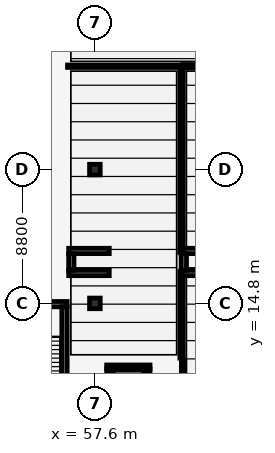
"""IFC4 building model, lengths in metres.
Left out: names, types, materials, properties, quantities, classifications, styles, units other than length and angle.
Written with IfcOpenShell. Run it as: python <this file> out.ifc"""

import sys

from ifc_helpers import new_model, si_unit, direction, frame, frame_2d, origin, origin_2d, place, context, subcontext, project, spatial, rectangle, extrude, element, fill, save


model = new_model("IFC4")
c1 = context("Model", 3, precision=1e-05, world=origin(), true_north=direction((0.0, 1.0)))
c2 = subcontext(c1, "Body", "Model", "MODEL_VIEW")
j1 = project(units=[si_unit("LENGTHUNIT", "METRE"), si_unit("PLANEANGLEUNIT", "RADIAN")], contexts=[c1])
p1 = place(None, origin())
s1 = spatial("IfcSite", under=j1, at=p1, CompositionType="ELEMENT")
p2 = place(p1, origin())
s2 = spatial("IfcBuilding", under=s1, at=p2, CompositionType="ELEMENT")
p3 = place(p2, frame((0.0, 0.0, -4.2)))
s3 = spatial("IfcBuildingStorey", under=s2, at=p3, CompositionType="ELEMENT", Elevation=-4.2)
for number, where, z_axis, x_axis in (
    (1, (57.6, 14.8, 0.0), (0.0, 0.0, 1.0), (1.0, 0.0, 0.0)),
    (2, (57.6, 23.6, 0.0), (0.0, 0.0, 1.0), (1.0, 0.0, 0.0)),
):
    element("IfcColumn", number, at=place(p3, frame(where, z_axis=z_axis, x_axis=x_axis)), inside=s3, PredefinedType="COLUMN", context=c2, shape_type="SweptSolid", body=[
        extrude(rectangle(XDim=0.7, YDim=0.7, at=origin_2d()), origin(), (0.0, 0.0, 1.0), 4.2),
    ])
p4 = place(p3, frame((50.125, 14.75, 0.0), z_axis=(0.0, 0.0, 1.0), x_axis=(1.0, 0.0, 0.0)))
e3 = element("IfcWall", 3, at=p4, inside=s3, PredefinedType="SHEAR", context=c2, shape_type="SweptSolid", body=[
    extrude(rectangle(XDim=5.65, YDim=0.35, at=frame_2d((2.825, 0.0))), origin(), (0.0, 0.0, 1.0), 3.95),
])
p5 = place(p3, frame((55.6, 14.575, 0.0), z_axis=(0.0, 0.0, 1.0), x_axis=(0.0, -1.0, 0.0)))
e4 = element("IfcWall", 4, at=p5, inside=s3, PredefinedType="SHEAR", context=c2, shape_type="SweptSolid", body=[
    extrude(rectangle(XDim=7.95, YDim=0.35, at=frame_2d((3.975, 0.0))), origin(), (0.0, 0.0, 1.0), 3.95),
])
p6 = place(p5, frame((5.68, 0.0, 0.0)))
e5 = element("IfcOpeningElement", 5, at=p6, cuts=e4, PredefinedType="OPENING", context=c2, shape_type="SweptSolid", body=[
    extrude(rectangle(XDim=2.05, YDim=2.15, at=frame_2d((1.025, 1.075))), frame((0.0, 0.185, 0.0), z_axis=(0.0, -1.0, 0.0), x_axis=(1.0, 0.0, 0.0)), (0.0, 0.0, 1.0), 0.37),
])
for number, where, z_axis, x_axis in (
    (6, (55.875, 16.8, 0.0), (0.0, 0.0, 1.0), (1.0, 0.0, 0.0)),
    (7, (55.875, 18.25, 0.0), (0.0, 0.0, 1.0), (1.0, 0.0, 0.0)),
):
    element("IfcWall", number, at=place(p3, frame(where, z_axis=z_axis, x_axis=x_axis)), inside=s3, PredefinedType="SHEAR", context=c2, shape_type="SweptSolid", body=[
        extrude(rectangle(XDim=2.67, YDim=0.35, at=frame_2d((1.335, 0.0))), origin(), (0.0, 0.0, 1.0), 3.92),
    ])
p7 = place(p3, frame((56.05, 16.975, 0.0), z_axis=(0.0, 0.0, 1.0), x_axis=(0.0, 1.0, 0.0)))
e8 = element("IfcWall", 8, at=p7, inside=s3, PredefinedType="SHEAR", context=c2, shape_type="SweptSolid", body=[
    extrude(rectangle(XDim=1.1, YDim=0.35, at=frame_2d((0.55, 0.0))), origin(), (0.0, 0.0, 1.0), 3.92),
])
for number, where, z_axis, x_axis in (
    (9, (63.275, 16.8, 0.0), (0.0, 0.0, 1.0), (1.0, 0.0, 0.0)),
    (10, (63.275, 18.25, 0.0), (0.0, 0.0, 1.0), (1.0, 0.0, 0.0)),
):
    element("IfcWall", number, at=place(p3, frame(where, z_axis=z_axis, x_axis=x_axis)), inside=s3, PredefinedType="SHEAR", context=c2, shape_type="SweptSolid", body=[
        extrude(rectangle(XDim=2.67, YDim=0.35, at=frame_2d((1.335, 0.0))), origin(), (0.0, 0.0, 1.0), 3.92),
    ])
p8 = place(p3, frame((63.45, 16.975, 0.0), z_axis=(0.0, 0.0, 1.0), x_axis=(0.0, 1.0, 0.0)))
e11 = element("IfcWall", 11, at=p8, inside=s3, PredefinedType="SHEAR", context=c2, shape_type="SweptSolid", body=[
    extrude(rectangle(XDim=1.1, YDim=0.35, at=frame_2d((0.55, 0.0))), origin(), (0.0, 0.0, 1.0), 3.92),
])
p9 = place(p3, frame((58.375, 10.625, -1.5), z_axis=(0.0, 0.0, 1.0), x_axis=(1.0, 0.0, 0.0)))
e12 = element("IfcWall", 12, at=p9, inside=s3, PredefinedType="SOLIDWALL", context=c2, shape_type="SweptSolid", body=[
    extrude(rectangle(XDim=2.85, YDim=0.25, at=frame_2d((1.425, 0.0))), origin(), (0.0, 0.0, 1.0), 5.45),
])
p10 = place(p9, frame((0.875, 0.0, 1.5)))
e13 = element("IfcOpeningElement", 13, at=p10, cuts=e12, PredefinedType="OPENING", context=c2, shape_type="SweptSolid", body=[
    extrude(rectangle(XDim=1.1, YDim=2.15, at=frame_2d((0.55, 1.075))), frame((0.0, 0.135, 0.0), z_axis=(0.0, -1.0, 0.0), x_axis=(1.0, 0.0, 0.0)), (0.0, 0.0, 1.0), 0.27),
])
for number, where, z_axis, x_axis in (
    (14, (58.5, 8.7, -1.5), (0.0, 0.0, 1.0), (0.0, 1.0, 0.0)),
    (15, (61.1, 10.5, -1.5), (0.0, 0.0, 1.0), (0.0, -1.0, 0.0)),
):
    element("IfcWall", number, at=place(p3, frame(where, z_axis=z_axis, x_axis=x_axis)), inside=s3, PredefinedType="SOLIDWALL", context=c2, shape_type="SweptSolid", body=[
        extrude(rectangle(XDim=1.8, YDim=0.25, at=frame_2d((0.9, 0.0))), origin(), (0.0, 0.0, 1.0), 5.45),
    ])
p11 = place(p3, frame((63.3, 11.2, 0.0), z_axis=(0.0, 0.0, 1.0), x_axis=(0.0, 1.0, 0.0)))
e16 = element("IfcWall", 16, at=p11, inside=s3, PredefinedType="PARTITIONING", context=c2, shape_type="SweptSolid", body=[
    extrude(rectangle(XDim=5.695, YDim=0.22, at=frame_2d((2.848, 0.0))), origin(), (0.0, 0.0, 1.0), 3.84),
])
p12 = place(p11, frame((2.098, 0.0, 0.0)))
e17 = element("IfcOpeningElement", 17, at=p12, cuts=e16, PredefinedType="OPENING", context=c2, shape_type="SweptSolid", body=[
    extrude(rectangle(XDim=1.5, YDim=2.2, at=frame_2d((0.75, 1.1))), frame((0.0, 0.12, 0.0), z_axis=(0.0, -1.0, 0.0), x_axis=(1.0, 0.0, 0.0)), (0.0, 0.0, 1.0), 0.24),
])
p13 = place(p3, frame((63.3, 18.155, 0.0), z_axis=(0.0, 0.0, 1.0), x_axis=(0.0, 1.0, 0.0)))
e18 = element("IfcWall", 18, at=p13, inside=s3, PredefinedType="PARTITIONING", context=c2, shape_type="SweptSolid", body=[
    extrude(rectangle(XDim=12.145, YDim=0.22, at=frame_2d((6.073, 0.0))), origin(), (0.0, 0.0, 1.0), 3.84),
])
p14 = place(p13, frame((5.323, 0.0, 0.0)))
e19 = element("IfcOpeningElement", 19, at=p14, cuts=e18, PredefinedType="OPENING", context=c2, shape_type="SweptSolid", body=[
    extrude(rectangle(XDim=1.5, YDim=2.2, at=frame_2d((0.75, 1.1))), frame((0.0, 0.12, 0.0), z_axis=(0.0, -1.0, 0.0), x_axis=(1.0, 0.0, 0.0)), (0.0, 0.0, 1.0), 0.24),
])
p15 = place(p3, frame((55.8, 30.4, 0.0), z_axis=(0.0, 0.0, 1.0), x_axis=(1.0, 0.0, 0.0)))
e20 = element("IfcWall", 20, at=p15, inside=s3, PredefinedType="PARTITIONING", context=c2, shape_type="SweptSolid", body=[
    extrude(rectangle(XDim=7.4, YDim=0.16, at=frame_2d((3.7, 0.0))), origin(), (0.0, 0.0, 1.0), 3.84),
])
p16 = place(p15, frame((3.044, 0.0, 0.0)))
e21 = element("IfcOpeningElement", 21, at=p16, cuts=e20, PredefinedType="OPENING", context=c2, shape_type="SweptSolid", body=[
    extrude(rectangle(XDim=1.8, YDim=2.15, at=frame_2d((0.9, 1.075))), frame((0.0, 0.09, 0.0), z_axis=(0.0, -1.0, 0.0), x_axis=(1.0, 0.0, 0.0)), (0.0, 0.0, 1.0), 0.18),
])
p17 = place(p3, frame((63.4, 30.4, 0.0), z_axis=(0.0, 0.0, 1.0), x_axis=(1.0, 0.0, 0.0)))
e22 = element("IfcWall", 22, at=p17, inside=s3, PredefinedType="PARTITIONING", context=c2, shape_type="SweptSolid", body=[
    extrude(rectangle(XDim=32.55, YDim=0.22, at=frame_2d((16.275, 0.0))), origin(), (0.0, 0.0, 1.0), 3.84),
])
p18 = place(p17, frame((15.525, 0.0, 0.0)))
e23 = element("IfcOpeningElement", 23, at=p18, cuts=e22, PredefinedType="OPENING", context=c2, shape_type="SweptSolid", body=[
    extrude(rectangle(XDim=1.5, YDim=2.2, at=frame_2d((0.75, 1.1))), frame((0.0, 0.12, 0.0), z_axis=(0.0, -1.0, 0.0), x_axis=(1.0, 0.0, 0.0)), (0.0, 0.0, 1.0), 0.24),
])
p19 = place(p3, frame((63.4, 6.05, 0.0), z_axis=(0.0, 0.0, 1.0), x_axis=(0.0, 1.0, 0.0)))
e24 = element("IfcWall", 24, at=p19, inside=s3, PredefinedType="PARTITIONING", context=c2, shape_type="SweptSolid", body=[
    extrude(rectangle(XDim=5.01, YDim=0.22, at=frame_2d((2.505, 0.0))), origin(), (0.0, 0.0, 1.0), 3.84),
])
p20 = place(p10, origin())
e25 = element("IfcDoor", 25, at=p20, inside=s3, OperationType="DOUBLE_DOOR_SLIDING", PredefinedType="DOOR", context=c2, shape_type="SweptSolid", body=[
    extrude(rectangle(XDim=1.1, YDim=2.15, at=frame_2d((0.55, 1.075))), frame((0.0, 0.025, 0.0), z_axis=(0.0, -1.0, 0.0), x_axis=(1.0, 0.0, 0.0)), (0.0, 0.0, 1.0), 0.05),
])
fill(e13, e25)
p21 = place(p12, origin())
e26 = element("IfcDoor", 26, at=p21, inside=s3, OperationType="SLIDING_TO_RIGHT", PredefinedType="DOOR", context=c2, shape_type="SweptSolid", body=[
    extrude(rectangle(XDim=1.5, YDim=2.2, at=frame_2d((0.75, 1.1))), frame((0.0, 0.025, 0.0), z_axis=(0.0, -1.0, 0.0), x_axis=(1.0, 0.0, 0.0)), (0.0, 0.0, 1.0), 0.05),
])
fill(e17, e26)
p22 = place(p14, origin())
e27 = element("IfcDoor", 27, at=p22, inside=s3, OperationType="SLIDING_TO_RIGHT", PredefinedType="DOOR", context=c2, shape_type="SweptSolid", body=[
    extrude(rectangle(XDim=1.5, YDim=2.2, at=frame_2d((0.75, 1.1))), frame((0.0, 0.025, 0.0), z_axis=(0.0, -1.0, 0.0), x_axis=(1.0, 0.0, 0.0)), (0.0, 0.0, 1.0), 0.05),
])
fill(e19, e27)
p23 = place(p16, origin())
e28 = element("IfcDoor", 28, at=p23, inside=s3, OperationType="DOUBLE_DOOR_SINGLE_SWING", PredefinedType="DOOR", context=c2, shape_type="SweptSolid", body=[
    extrude(rectangle(XDim=1.8, YDim=2.15, at=frame_2d((0.9, 1.075))), frame((0.0, 0.025, 0.0), z_axis=(0.0, -1.0, 0.0), x_axis=(1.0, 0.0, 0.0)), (0.0, 0.0, 1.0), 0.05),
])
fill(e21, e28)
save(model, sys.argv[1])
